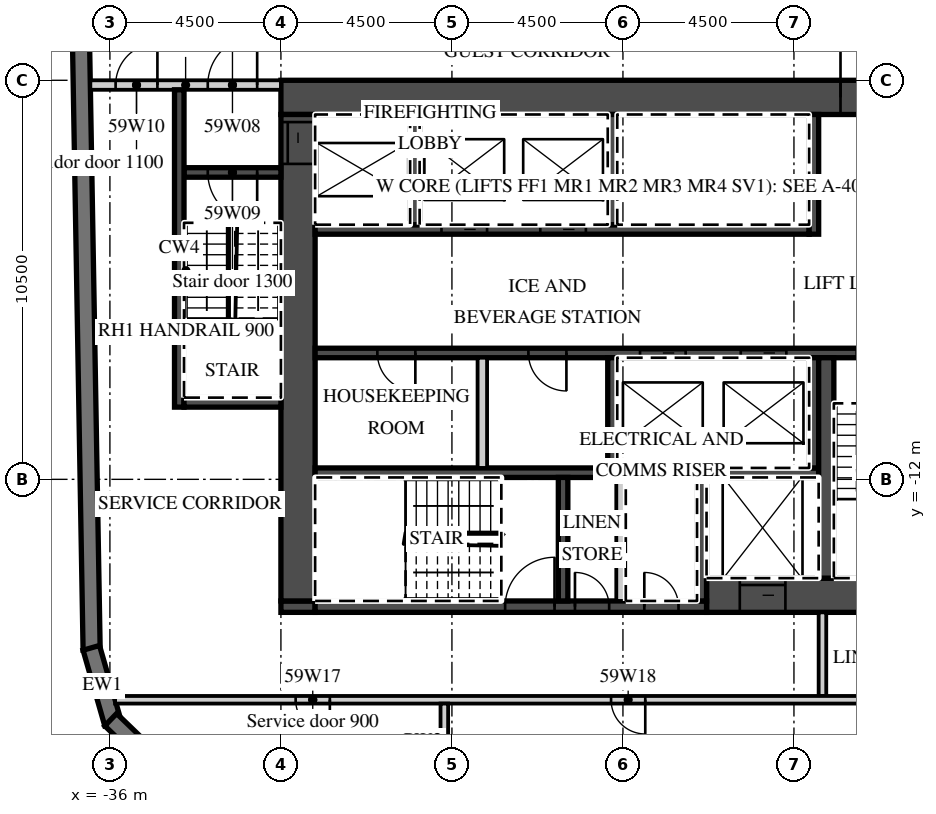
"""IFC4 building model, lengths in metres.
Left out: names, types, materials, properties, quantities, classifications, styles, units other than length and angle.
Written with IfcOpenShell. Run it as: python <this file> out.ifc"""

import sys

from ifc_helpers import new_model, si_unit, direction, frame, frame_2d, origin, place, context, subcontext, project, spatial, polyline, rectangle, outline, extrude, element, fill, save


model = new_model("IFC4")
c1 = context("Model", 3, precision=1e-05, world=origin(), true_north=direction((0.0, 1.0)))
c2 = subcontext(c1, "Body", "Model", "MODEL_VIEW")
j1 = project(units=[si_unit("LENGTHUNIT", "METRE"), si_unit("PLANEANGLEUNIT", "RADIAN")], contexts=[c1])
p1 = place(None, origin())
s1 = spatial("IfcSite", under=j1, at=p1, CompositionType="ELEMENT")
p2 = place(p1, origin())
s2 = spatial("IfcBuilding", under=s1, at=p2, CompositionType="ELEMENT")
p3 = place(p2, frame((0.0, 0.0, 240.8)))
s3 = spatial("IfcBuildingStorey", under=s2, at=p3, CompositionType="ELEMENT", Elevation=240.8)
p4 = place(p3, frame((-37.057, 16.503, 0.0), z_axis=(0.0, 0.0, 1.0), x_axis=(0.017452279857, -0.999847697366, 0.0)))
e1 = element("IfcWall", 1, at=p4, inside=s3, PredefinedType="SOLIDWALL", context=c2, shape_type="SweptSolid", body=[
    extrude(rectangle(XDim=33.0, YDim=0.45, at=frame_2d((16.5, 0.0))), origin(), (0.0, 0.0, 1.0), 3.02),
])
p5 = place(p3, frame((-36.49, -16.434, 0.0), z_axis=(0.0, 0.0, 1.0), x_axis=(0.275577603096, -0.961278827745, 0.0)))
e2 = element("IfcWall", 2, at=p5, inside=s3, PredefinedType="SOLIDWALL", context=c2, shape_type="SweptSolid", body=[
    extrude(outline(polyline([(0.0, -0.225), (2.071, -0.225), (1.95, 0.225), (0.121, 0.225), (0.0, -0.225)])), origin(), (0.0, 0.0, 1.0), 3.02),
])
p6 = place(p3, frame((-35.979, -18.324, 0.0), z_axis=(0.0, 0.0, 1.0), x_axis=(0.719320193998, -0.694678672846, 0.0)))
e3 = element("IfcWall", 3, at=p6, inside=s3, PredefinedType="SOLIDWALL", context=c2, shape_type="SweptSolid", body=[
    extrude(outline(polyline([(0.0, -0.225), (2.071, -0.225), (1.95, 0.225), (0.121, 0.225), (0.0, -0.225)])), origin(), (0.0, 0.0, 1.0), 3.02),
])
p7 = place(p3, frame((-31.5, -1.95, 0.0), z_axis=(0.0, 0.0, 1.0), x_axis=(1.0, 0.0, 0.0)))
e4 = element("IfcWall", 4, at=p7, inside=s3, PredefinedType="SHEAR", context=c2, shape_type="SweptSolid", body=[
    extrude(rectangle(XDim=18.0, YDim=0.9, at=frame_2d((9.0, 0.0))), origin(), (0.0, 0.0, 1.0), 3.02),
])
p8 = place(p7, frame((14.725, 0.0, 0.0)))
e5 = element("IfcOpeningElement", 5, at=p8, cuts=e4, PredefinedType="OPENING", context=c2, shape_type="SweptSolid", body=[
    extrude(rectangle(XDim=1.8, YDim=2.1, at=frame_2d((0.9, 1.05))), frame((0.0, 0.46, 0.0), z_axis=(0.0, -1.0, 0.0), x_axis=(1.0, 0.0, 0.0)), (0.0, 0.0, 1.0), 0.92),
])
p9 = place(p3, frame((-20.3, -15.05, 0.0), z_axis=(0.0, 0.0, 1.0), x_axis=(1.0, 0.0, 0.0)))
e6 = element("IfcWall", 6, at=p9, inside=s3, PredefinedType="SHEAR", context=c2, shape_type="SweptSolid", body=[
    extrude(rectangle(XDim=6.8, YDim=0.9, at=frame_2d((3.4, 0.0))), origin(), (0.0, 0.0, 1.0), 3.02),
])
p10 = place(p9, frame((0.875, 0.0, 0.0)))
e7 = element("IfcOpeningElement", 7, at=p10, cuts=e6, PredefinedType="OPENING", context=c2, shape_type="SweptSolid", body=[
    extrude(rectangle(XDim=1.2, YDim=2.1, at=frame_2d((0.6, 1.05))), frame((0.0, 0.46, 0.0), z_axis=(0.0, -1.0, 0.0), x_axis=(1.0, 0.0, 0.0)), (0.0, 0.0, 1.0), 0.92),
])
p11 = place(p3, frame((-31.5, -15.35, 0.0), z_axis=(0.0, 0.0, 1.0), x_axis=(1.0, 0.0, 0.0)))
e8 = element("IfcWall", 8, at=p11, inside=s3, PredefinedType="SHEAR", context=c2, shape_type="SweptSolid", body=[
    extrude(rectangle(XDim=0.9, YDim=0.3, at=frame_2d((0.45, 0.0))), origin(), (0.0, 0.0, 1.0), 3.02),
])
p12 = place(p3, frame((-30.6, -15.35, 0.0), z_axis=(0.0, 0.0, 1.0), x_axis=(1.0, 0.0, 0.0)))
e9 = element("IfcWall", 9, at=p12, inside=s3, PredefinedType="SHEAR", context=c2, shape_type="SweptSolid", body=[
    extrude(rectangle(XDim=10.3, YDim=0.3, at=frame_2d((5.15, 0.0))), origin(), (0.0, 0.0, 1.0), 3.02),
])
p13 = place(p12, frame((5.0, 0.0, 0.0)))
e10 = element("IfcOpeningElement", 10, at=p13, cuts=e9, PredefinedType="OPENING", context=c2, shape_type="SweptSolid", body=[
    extrude(rectangle(XDim=1.3, YDim=2.1, at=frame_2d((0.65, 1.05))), frame((0.0, 0.16, 0.0), z_axis=(0.0, -1.0, 0.0), x_axis=(1.0, 0.0, 0.0)), (0.0, 0.0, 1.0), 0.32),
])
p14 = place(p12, frame((6.837, 0.0, 0.0)))
e11 = element("IfcOpeningElement", 11, at=p14, cuts=e9, PredefinedType="OPENING", context=c2, shape_type="SweptSolid", body=[
    extrude(rectangle(XDim=0.9, YDim=2.1, at=frame_2d((0.45, 1.05))), frame((0.0, 0.16, 0.0), z_axis=(0.0, -1.0, 0.0), x_axis=(1.0, 0.0, 0.0)), (0.0, 0.0, 1.0), 0.32),
])
p15 = place(p12, frame((8.663, 0.0, 0.0)))
e12 = element("IfcOpeningElement", 12, at=p15, cuts=e9, PredefinedType="OPENING", context=c2, shape_type="SweptSolid", body=[
    extrude(rectangle(XDim=0.9, YDim=2.1, at=frame_2d((0.45, 1.05))), frame((0.0, 0.16, 0.0), z_axis=(0.0, -1.0, 0.0), x_axis=(1.0, 0.0, 0.0)), (0.0, 0.0, 1.0), 0.32),
])
p16 = place(p3, frame((-31.05, -15.2, 0.0), z_axis=(0.0, 0.0, 1.0), x_axis=(0.0, 1.0, 0.0)))
e13 = element("IfcWall", 13, at=p16, inside=s3, PredefinedType="SHEAR", context=c2, shape_type="SweptSolid", body=[
    extrude(rectangle(XDim=12.8, YDim=0.9, at=frame_2d((6.4, 0.0))), origin(), (0.0, 0.0, 1.0), 3.02),
])
p17 = place(p16, frame((11.5, 0.0, 0.0)))
e14 = element("IfcOpeningElement", 14, at=p17, cuts=e13, PredefinedType="OPENING", context=c2, shape_type="SweptSolid", body=[
    extrude(rectangle(XDim=1.1, YDim=2.1, at=frame_2d((0.55, 1.05))), frame((0.0, 0.46, 0.0), z_axis=(0.0, -1.0, 0.0), x_axis=(1.0, 0.0, 0.0)), (0.0, 0.0, 1.0), 0.92),
])
p18 = place(p3, frame((-30.6, -5.425, 0.0), z_axis=(0.0, 0.0, 1.0), x_axis=(1.0, 0.0, 0.0)))
e15 = element("IfcWall", 15, at=p18, inside=s3, PredefinedType="SHEAR", context=c2, shape_type="SweptSolid", body=[
    extrude(rectangle(XDim=13.0, YDim=0.25, at=frame_2d((6.5, 0.0))), origin(), (0.0, 0.0, 1.0), 3.02),
])
p19 = place(p18, frame((3.325, 0.0, 0.0)))
e16 = element("IfcOpeningElement", 16, at=p19, cuts=e15, PredefinedType="OPENING", context=c2, shape_type="SweptSolid", body=[
    extrude(rectangle(XDim=1.2, YDim=2.1, at=frame_2d((0.6, 1.05))), frame((0.0, 0.135, 0.0), z_axis=(0.0, -1.0, 0.0), x_axis=(1.0, 0.0, 0.0)), (0.0, 0.0, 1.0), 0.27),
])
p20 = place(p18, frame((5.925, 0.0, 0.0)))
e17 = element("IfcOpeningElement", 17, at=p20, cuts=e15, PredefinedType="OPENING", context=c2, shape_type="SweptSolid", body=[
    extrude(rectangle(XDim=1.2, YDim=2.1, at=frame_2d((0.6, 1.05))), frame((0.0, 0.135, 0.0), z_axis=(0.0, -1.0, 0.0), x_axis=(1.0, 0.0, 0.0)), (0.0, 0.0, 1.0), 0.27),
])
p21 = place(p3, frame((-17.475, -5.55, 0.0), z_axis=(0.0, 0.0, 1.0), x_axis=(0.0, 1.0, 0.0)))
e18 = element("IfcWall", 18, at=p21, inside=s3, PredefinedType="SHEAR", context=c2, shape_type="SweptSolid", body=[
    extrude(rectangle(XDim=3.15, YDim=0.25, at=frame_2d((1.575, 0.0))), origin(), (0.0, 0.0, 1.0), 3.02),
])
for number, where, z_axis, x_axis in (
    (19, (-27.975, -5.3, 0.0), (0.0, 0.0, 1.0), (0.0, 1.0, 0.0)),
    (20, (-22.775, -5.3, 0.0), (0.0, 0.0, 1.0), (0.0, 1.0, 0.0)),
):
    element("IfcWall", number, at=place(p3, frame(where, z_axis=z_axis, x_axis=x_axis)), inside=s3, PredefinedType="SHEAR", context=c2, shape_type="SweptSolid", body=[
        extrude(rectangle(XDim=2.9, YDim=0.25, at=frame_2d((1.45, 0.0))), origin(), (0.0, 0.0, 1.0), 3.02),
    ])
p22 = place(p3, frame((-30.6, -8.675, 0.0), z_axis=(0.0, 0.0, 1.0), x_axis=(1.0, 0.0, 0.0)))
e21 = element("IfcWall", 21, at=p22, inside=s3, PredefinedType="SHEAR", context=c2, shape_type="SweptSolid", body=[
    extrude(rectangle(XDim=16.2, YDim=0.25, at=frame_2d((8.1, 0.0))), origin(), (0.0, 0.0, 1.0), 3.02),
])
p23 = place(p22, frame((8.55, 0.0, 0.0)))
e22 = element("IfcOpeningElement", 22, at=p23, cuts=e21, PredefinedType="OPENING", context=c2, shape_type="SweptSolid", body=[
    extrude(rectangle(XDim=1.2, YDim=2.1, at=frame_2d((0.6, 1.05))), frame((0.0, 0.135, 0.0), z_axis=(0.0, -1.0, 0.0), x_axis=(1.0, 0.0, 0.0)), (0.0, 0.0, 1.0), 0.27),
])
p24 = place(p22, frame((11.2, 0.0, 0.0)))
e23 = element("IfcOpeningElement", 23, at=p24, cuts=e21, PredefinedType="OPENING", context=c2, shape_type="SweptSolid", body=[
    extrude(rectangle(XDim=1.2, YDim=2.1, at=frame_2d((0.6, 1.05))), frame((0.0, 0.135, 0.0), z_axis=(0.0, -1.0, 0.0), x_axis=(1.0, 0.0, 0.0)), (0.0, 0.0, 1.0), 0.27),
])
p25 = place(p22, frame((14.25, 0.0, 0.0)))
e24 = element("IfcOpeningElement", 24, at=p25, cuts=e21, PredefinedType="OPENING", context=c2, shape_type="SweptSolid", body=[
    extrude(rectangle(XDim=1.3, YDim=2.1, at=frame_2d((0.65, 1.05))), frame((0.0, 0.135, 0.0), z_axis=(0.0, -1.0, 0.0), x_axis=(1.0, 0.0, 0.0)), (0.0, 0.0, 1.0), 0.27),
])
p26 = place(p22, frame((1.637, 0.0, 0.0)))
e25 = element("IfcOpeningElement", 25, at=p26, cuts=e21, PredefinedType="OPENING", context=c2, shape_type="SweptSolid", body=[
    extrude(rectangle(XDim=1.0, YDim=2.1, at=frame_2d((0.5, 1.05))), frame((0.0, 0.135, 0.0), z_axis=(0.0, -1.0, 0.0), x_axis=(1.0, 0.0, 0.0)), (0.0, 0.0, 1.0), 0.27),
])
p27 = place(p22, frame((5.613, 0.0, 0.0)))
e26 = element("IfcOpeningElement", 26, at=p27, cuts=e21, PredefinedType="OPENING", context=c2, shape_type="SweptSolid", body=[
    extrude(rectangle(XDim=1.0, YDim=2.1, at=frame_2d((0.5, 1.05))), frame((0.0, 0.135, 0.0), z_axis=(0.0, -1.0, 0.0), x_axis=(1.0, 0.0, 0.0)), (0.0, 0.0, 1.0), 0.27),
])
p28 = place(p3, frame((-30.6, -11.825, 0.0), z_axis=(0.0, 0.0, 1.0), x_axis=(1.0, 0.0, 0.0)))
e27 = element("IfcWall", 27, at=p28, inside=s3, PredefinedType="SHEAR", context=c2, shape_type="SweptSolid", body=[
    extrude(rectangle(XDim=13.25, YDim=0.25, at=frame_2d((6.625, 0.0))), origin(), (0.0, 0.0, 1.0), 3.02),
])
for number, where, z_axis, x_axis in (
    (28, (-17.475, -11.7, 0.0), (0.0, 0.0, 1.0), (0.0, 1.0, 0.0)),
    (29, (-22.775, -11.7, 0.0), (0.0, 0.0, 1.0), (0.0, 1.0, 0.0)),
):
    element("IfcWall", number, at=place(p3, frame(where, z_axis=z_axis, x_axis=x_axis)), inside=s3, PredefinedType="SHEAR", context=c2, shape_type="SweptSolid", body=[
        extrude(rectangle(XDim=2.9, YDim=0.25, at=frame_2d((1.45, 0.0))), origin(), (0.0, 0.0, 1.0), 3.02),
    ])
p29 = place(p3, frame((-26.2, -11.7, 0.0), z_axis=(0.0, 0.0, 1.0), x_axis=(0.0, 1.0, 0.0)))
e30 = element("IfcWall", 30, at=p29, inside=s3, PredefinedType="PARTITIONING", context=c2, shape_type="SweptSolid", body=[
    extrude(rectangle(XDim=2.9, YDim=0.25, at=frame_2d((1.45, 0.0))), origin(), (0.0, 0.0, 1.0), 3.02),
])
p30 = place(p3, frame((-17.15, -14.6, 0.0), z_axis=(0.0, 0.0, 1.0), x_axis=(0.0, 1.0, 0.0)))
e31 = element("IfcWall", 31, at=p30, inside=s3, PredefinedType="SHEAR", context=c2, shape_type="SweptSolid", body=[
    extrude(rectangle(XDim=5.8, YDim=0.4, at=frame_2d((2.9, 0.0))), origin(), (0.0, 0.0, 1.0), 3.02),
])
for number, where, z_axis, x_axis in (
    (32, (-20.425, -15.2, 0.0), (0.0, 0.0, 1.0), (0.0, 1.0, 0.0)),
    (33, (-24.075, -15.2, 0.0), (0.0, 0.0, 1.0), (0.0, 1.0, 0.0)),
):
    element("IfcWall", number, at=place(p3, frame(where, z_axis=z_axis, x_axis=x_axis)), inside=s3, PredefinedType="SHEAR", context=c2, shape_type="SweptSolid", body=[
        extrude(rectangle(XDim=3.25, YDim=0.25, at=frame_2d((1.625, 0.0))), origin(), (0.0, 0.0, 1.0), 3.02),
    ])
p31 = place(p3, frame((-22.55, -15.2, 0.0), z_axis=(0.0, 0.0, 1.0), x_axis=(0.0, 1.0, 0.0)))
e34 = element("IfcWall", 34, at=p31, inside=s3, PredefinedType="PARTITIONING", context=c2, shape_type="SweptSolid", body=[
    extrude(rectangle(XDim=3.25, YDim=0.25, at=frame_2d((1.625, 0.0))), origin(), (0.0, 0.0, 1.0), 3.02),
])
p32 = place(p3, frame((-36.515, -1.625, 0.0), z_axis=(0.0, 0.0, 1.0), x_axis=(1.0, 0.0, 0.0)))
e35 = element("IfcWall", 35, at=p32, inside=s3, PredefinedType="PARTITIONING", context=c2, shape_type="SweptSolid", body=[
    extrude(rectangle(XDim=5.015, YDim=0.25, at=frame_2d((2.508, 0.0))), origin(), (0.0, 0.0, 1.0), 3.02),
])
p33 = place(p32, frame((3.09, 0.0, 0.0)))
e36 = element("IfcOpeningElement", 36, at=p33, cuts=e35, PredefinedType="OPENING", context=c2, shape_type="SweptSolid", body=[
    extrude(rectangle(XDim=1.3, YDim=2.1, at=frame_2d((0.65, 1.05))), frame((0.0, 0.135, 0.0), z_axis=(0.0, -1.0, 0.0), x_axis=(1.0, 0.0, 0.0)), (0.0, 0.0, 1.0), 0.27),
])
p34 = place(p32, frame((0.665, 0.0, 0.0)))
e37 = element("IfcOpeningElement", 37, at=p34, cuts=e35, PredefinedType="OPENING", context=c2, shape_type="SweptSolid", body=[
    extrude(rectangle(XDim=1.1, YDim=2.1, at=frame_2d((0.55, 1.05))), frame((0.0, 0.135, 0.0), z_axis=(0.0, -1.0, 0.0), x_axis=(1.0, 0.0, 0.0)), (0.0, 0.0, 1.0), 0.27),
])
p35 = place(p3, frame((-34.05, -3.925, 0.0), z_axis=(0.0, 0.0, 1.0), x_axis=(1.0, 0.0, 0.0)))
e38 = element("IfcWall", 38, at=p35, inside=s3, PredefinedType="SHEAR", context=c2, shape_type="SweptSolid", body=[
    extrude(rectangle(XDim=2.55, YDim=0.25, at=frame_2d((1.275, 0.0))), origin(), (0.0, 0.0, 1.0), 3.02),
])
p36 = place(p35, frame((0.625, 0.0, 0.0)))
e39 = element("IfcOpeningElement", 39, at=p36, cuts=e38, PredefinedType="OPENING", context=c2, shape_type="SweptSolid", body=[
    extrude(rectangle(XDim=1.3, YDim=2.1, at=frame_2d((0.65, 1.05))), frame((0.0, 0.135, 0.0), z_axis=(0.0, -1.0, 0.0), x_axis=(1.0, 0.0, 0.0)), (0.0, 0.0, 1.0), 0.27),
])
p37 = place(p3, frame((-34.175, -10.1, 0.0), z_axis=(0.0, 0.0, 1.0), x_axis=(0.0, 1.0, 0.0)))
e40 = element("IfcWall", 40, at=p37, inside=s3, PredefinedType="SHEAR", context=c2, shape_type="SweptSolid", body=[
    extrude(rectangle(XDim=8.35, YDim=0.25, at=frame_2d((4.175, 0.0))), origin(), (0.0, 0.0, 1.0), 3.02),
])
p38 = place(p3, frame((-34.05, -9.975, 0.0), z_axis=(0.0, 0.0, 1.0), x_axis=(1.0, 0.0, 0.0)))
e41 = element("IfcWall", 41, at=p38, inside=s3, PredefinedType="SHEAR", context=c2, shape_type="SweptSolid", body=[
    extrude(rectangle(XDim=2.55, YDim=0.25, at=frame_2d((1.275, 0.0))), origin(), (0.0, 0.0, 1.0), 3.02),
])
p39 = place(p3, frame((-17.25, -17.7, 0.0), z_axis=(0.0, 0.0, 1.0), x_axis=(0.0, 1.0, 0.0)))
e42 = element("IfcWall", 42, at=p39, inside=s3, PredefinedType="PARTITIONING", context=c2, shape_type="SweptSolid", body=[
    extrude(rectangle(XDim=2.2, YDim=0.2, at=frame_2d((1.1, 0.0))), origin(), (0.0, 0.0, 1.0), 3.02),
])
p40 = place(p3, frame((-35.864, -17.8, 0.0), z_axis=(0.0, 0.0, 1.0), x_axis=(1.0, 0.0, 0.0)))
e43 = element("IfcWall", 43, at=p40, inside=s3, PredefinedType="PARTITIONING", context=c2, shape_type="SweptSolid", body=[
    extrude(rectangle(XDim=22.264, YDim=0.2, at=frame_2d((11.132, 0.0))), origin(), (0.0, 0.0, 1.0), 3.02),
])
p41 = place(p40, frame((4.751, 0.0, 0.0)))
e44 = element("IfcOpeningElement", 44, at=p41, cuts=e43, PredefinedType="OPENING", context=c2, shape_type="SweptSolid", body=[
    extrude(rectangle(XDim=0.9, YDim=2.1, at=frame_2d((0.45, 1.05))), frame((0.0, 0.11, 0.0), z_axis=(0.0, -1.0, 0.0), x_axis=(1.0, 0.0, 0.0)), (0.0, 0.0, 1.0), 0.22),
])
p42 = place(p40, frame((13.051, 0.0, 0.0)))
e45 = element("IfcOpeningElement", 45, at=p42, cuts=e43, PredefinedType="OPENING", context=c2, shape_type="SweptSolid", body=[
    extrude(rectangle(XDim=0.9, YDim=2.1, at=frame_2d((0.45, 1.05))), frame((0.0, 0.11, 0.0), z_axis=(0.0, -1.0, 0.0), x_axis=(1.0, 0.0, 0.0)), (0.0, 0.0, 1.0), 0.22),
])
p43 = place(p3, frame((-27.2, -19.88, 0.0), z_axis=(0.0, 0.0, 1.0), x_axis=(0.0, 1.0, 0.0)))
e46 = element("IfcWall", 46, at=p43, inside=s3, PredefinedType="PARTITIONING", context=c2, shape_type="SweptSolid", body=[
    extrude(rectangle(XDim=1.98, YDim=0.2, at=frame_2d((0.99, 0.0))), origin(), (0.0, 0.0, 1.0), 3.02),
])
p44 = place(p23, origin())
e47 = element("IfcDoor", 47, at=p44, inside=s3, OperationType="SLIDING_TO_LEFT", PredefinedType="DOOR", context=c2, shape_type="SweptSolid", body=[
    extrude(rectangle(XDim=1.2, YDim=2.1, at=frame_2d((0.6, 1.05))), frame((0.0, 0.025, 0.0), z_axis=(0.0, -1.0, 0.0), x_axis=(1.0, 0.0, 0.0)), (0.0, 0.0, 1.0), 0.05),
])
fill(e22, e47)
p45 = place(p24, origin())
e48 = element("IfcDoor", 48, at=p45, inside=s3, OperationType="SLIDING_TO_RIGHT", PredefinedType="DOOR", context=c2, shape_type="SweptSolid", body=[
    extrude(rectangle(XDim=1.2, YDim=2.1, at=frame_2d((0.6, 1.05))), frame((0.0, 0.025, 0.0), z_axis=(0.0, -1.0, 0.0), x_axis=(1.0, 0.0, 0.0)), (0.0, 0.0, 1.0), 0.05),
])
fill(e23, e48)
p46 = place(p19, origin())
e49 = element("IfcDoor", 49, at=p46, inside=s3, OperationType="SLIDING_TO_RIGHT", PredefinedType="DOOR", context=c2, shape_type="SweptSolid", body=[
    extrude(rectangle(XDim=1.2, YDim=2.1, at=frame_2d((0.6, 1.05))), frame((0.0, 0.025, 0.0), z_axis=(0.0, -1.0, 0.0), x_axis=(1.0, 0.0, 0.0)), (0.0, 0.0, 1.0), 0.05),
])
fill(e16, e49)
p47 = place(p20, origin())
e50 = element("IfcDoor", 50, at=p47, inside=s3, OperationType="SLIDING_TO_RIGHT", PredefinedType="DOOR", context=c2, shape_type="SweptSolid", body=[
    extrude(rectangle(XDim=1.2, YDim=2.1, at=frame_2d((0.6, 1.05))), frame((0.0, 0.025, 0.0), z_axis=(0.0, -1.0, 0.0), x_axis=(1.0, 0.0, 0.0)), (0.0, 0.0, 1.0), 0.05),
])
fill(e17, e50)
p48 = place(p10, origin())
e51 = element("IfcDoor", 51, at=p48, inside=s3, OperationType="SLIDING_TO_LEFT", PredefinedType="DOOR", context=c2, shape_type="SweptSolid", body=[
    extrude(rectangle(XDim=1.2, YDim=2.1, at=frame_2d((0.6, 1.05))), frame((0.0, 0.025, 0.0), z_axis=(0.0, -1.0, 0.0), x_axis=(1.0, 0.0, 0.0)), (0.0, 0.0, 1.0), 0.05),
])
fill(e7, e51)
p49 = place(p17, origin())
e52 = element("IfcDoor", 52, at=p49, inside=s3, OperationType="SLIDING_TO_RIGHT", PredefinedType="DOOR", context=c2, shape_type="SweptSolid", body=[
    extrude(rectangle(XDim=1.1, YDim=2.1, at=frame_2d((0.55, 1.05))), frame((0.0, 0.025, 0.0), z_axis=(0.0, -1.0, 0.0), x_axis=(1.0, 0.0, 0.0)), (0.0, 0.0, 1.0), 0.05),
])
fill(e14, e52)
p50 = place(p8, origin())
e53 = element("IfcDoor", 53, at=p50, inside=s3, OperationType="DOUBLE_DOOR_DOUBLE_SWING", PredefinedType="DOOR", context=c2, shape_type="SweptSolid", body=[
    extrude(rectangle(XDim=1.8, YDim=2.1, at=frame_2d((0.9, 1.05))), frame((0.0, 0.025, 0.0), z_axis=(0.0, -1.0, 0.0), x_axis=(1.0, 0.0, 0.0)), (0.0, 0.0, 1.0), 0.05),
])
fill(e5, e53)
p51 = place(p33, origin())
e54 = element("IfcDoor", 54, at=p51, inside=s3, OperationType="SINGLE_SWING_RIGHT", PredefinedType="DOOR", context=c2, shape_type="SweptSolid", body=[
    extrude(rectangle(XDim=1.3, YDim=2.1, at=frame_2d((0.65, 1.05))), frame((0.0, 0.025, 0.0), z_axis=(0.0, -1.0, 0.0), x_axis=(1.0, 0.0, 0.0)), (0.0, 0.0, 1.0), 0.05),
])
fill(e36, e54)
p52 = place(p36, origin())
e55 = element("IfcDoor", 55, at=p52, inside=s3, OperationType="SINGLE_SWING_RIGHT", PredefinedType="DOOR", context=c2, shape_type="SweptSolid", body=[
    extrude(rectangle(XDim=1.3, YDim=2.1, at=frame_2d((0.65, 1.05))), frame((0.0, 0.025, 0.0), z_axis=(0.0, -1.0, 0.0), x_axis=(1.0, 0.0, 0.0)), (0.0, 0.0, 1.0), 0.05),
])
fill(e39, e55)
p53 = place(p34, origin())
e56 = element("IfcDoor", 56, at=p53, inside=s3, OperationType="SINGLE_SWING_RIGHT", PredefinedType="DOOR", context=c2, shape_type="SweptSolid", body=[
    extrude(rectangle(XDim=1.1, YDim=2.1, at=frame_2d((0.55, 1.05))), frame((0.0, 0.025, 0.0), z_axis=(0.0, -1.0, 0.0), x_axis=(1.0, 0.0, 0.0)), (0.0, 0.0, 1.0), 0.05),
])
fill(e37, e56)
p54 = place(p25, origin())
e57 = element("IfcDoor", 57, at=p54, inside=s3, OperationType="SINGLE_SWING_RIGHT", PredefinedType="DOOR", context=c2, shape_type="SweptSolid", body=[
    extrude(rectangle(XDim=1.3, YDim=2.1, at=frame_2d((0.65, 1.05))), frame((0.0, 0.025, 0.0), z_axis=(0.0, -1.0, 0.0), x_axis=(1.0, 0.0, 0.0)), (0.0, 0.0, 1.0), 0.05),
])
fill(e24, e57)
p55 = place(p13, origin())
e58 = element("IfcDoor", 58, at=p55, inside=s3, OperationType="SINGLE_SWING_RIGHT", PredefinedType="DOOR", context=c2, shape_type="SweptSolid", body=[
    extrude(rectangle(XDim=1.3, YDim=2.1, at=frame_2d((0.65, 1.05))), frame((0.0, 0.025, 0.0), z_axis=(0.0, -1.0, 0.0), x_axis=(1.0, 0.0, 0.0)), (0.0, 0.0, 1.0), 0.05),
])
fill(e10, e58)
p56 = place(p14, origin())
e59 = element("IfcDoor", 59, at=p56, inside=s3, OperationType="SINGLE_SWING_LEFT", PredefinedType="DOOR", context=c2, shape_type="SweptSolid", body=[
    extrude(rectangle(XDim=0.9, YDim=2.1, at=frame_2d((0.45, 1.05))), frame((0.0, 0.025, 0.0), z_axis=(0.0, -1.0, 0.0), x_axis=(1.0, 0.0, 0.0)), (0.0, 0.0, 1.0), 0.05),
])
fill(e11, e59)
p57 = place(p15, origin())
e60 = element("IfcDoor", 60, at=p57, inside=s3, OperationType="SINGLE_SWING_LEFT", PredefinedType="DOOR", context=c2, shape_type="SweptSolid", body=[
    extrude(rectangle(XDim=0.9, YDim=2.1, at=frame_2d((0.45, 1.05))), frame((0.0, 0.025, 0.0), z_axis=(0.0, -1.0, 0.0), x_axis=(1.0, 0.0, 0.0)), (0.0, 0.0, 1.0), 0.05),
])
fill(e12, e60)
p58 = place(p26, origin())
e61 = element("IfcDoor", 61, at=p58, inside=s3, OperationType="SINGLE_SWING_RIGHT", PredefinedType="DOOR", context=c2, shape_type="SweptSolid", body=[
    extrude(rectangle(XDim=1.0, YDim=2.1, at=frame_2d((0.5, 1.05))), frame((0.0, 0.025, 0.0), z_axis=(0.0, -1.0, 0.0), x_axis=(1.0, 0.0, 0.0)), (0.0, 0.0, 1.0), 0.05),
])
fill(e25, e61)
p59 = place(p27, origin())
e62 = element("IfcDoor", 62, at=p59, inside=s3, OperationType="SINGLE_SWING_RIGHT", PredefinedType="DOOR", context=c2, shape_type="SweptSolid", body=[
    extrude(rectangle(XDim=1.0, YDim=2.1, at=frame_2d((0.5, 1.05))), frame((0.0, 0.025, 0.0), z_axis=(0.0, -1.0, 0.0), x_axis=(1.0, 0.0, 0.0)), (0.0, 0.0, 1.0), 0.05),
])
fill(e26, e62)
p60 = place(p41, origin())
e63 = element("IfcDoor", 63, at=p60, inside=s3, OperationType="SINGLE_SWING_RIGHT", PredefinedType="DOOR", context=c2, shape_type="SweptSolid", body=[
    extrude(rectangle(XDim=0.9, YDim=2.1, at=frame_2d((0.45, 1.05))), frame((0.0, 0.025, 0.0), z_axis=(0.0, -1.0, 0.0), x_axis=(1.0, 0.0, 0.0)), (0.0, 0.0, 1.0), 0.05),
])
fill(e44, e63)
p61 = place(p42, origin())
e64 = element("IfcDoor", 64, at=p61, inside=s3, OperationType="SINGLE_SWING_RIGHT", PredefinedType="DOOR", context=c2, shape_type="SweptSolid", body=[
    extrude(rectangle(XDim=0.9, YDim=2.1, at=frame_2d((0.45, 1.05))), frame((0.0, 0.025, 0.0), z_axis=(0.0, -1.0, 0.0), x_axis=(1.0, 0.0, 0.0)), (0.0, 0.0, 1.0), 0.05),
])
fill(e45, e64)
save(model, sys.argv[1])
